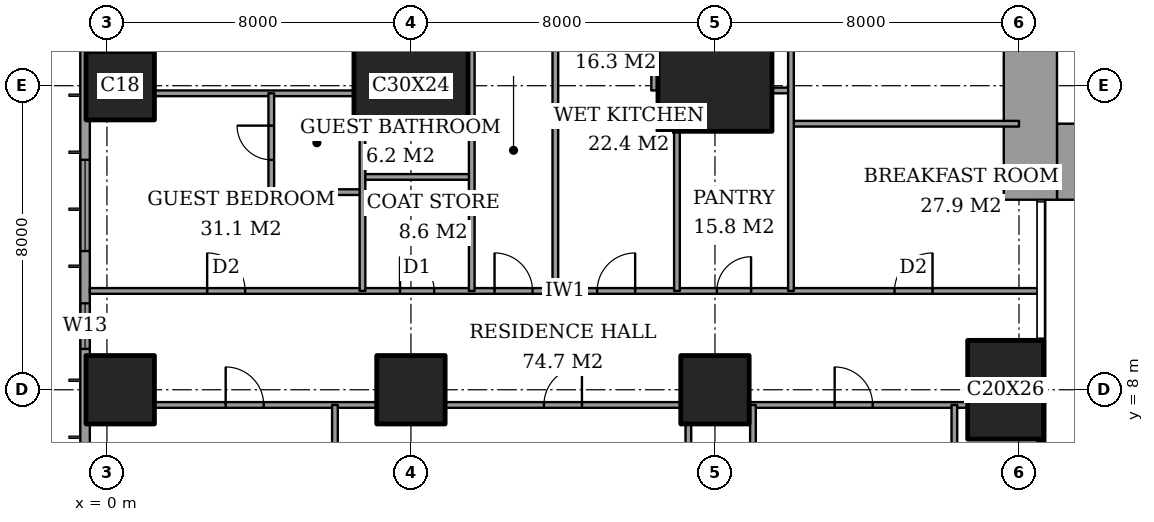
"""IFC4 building model, lengths in metres.
Left out: names, types, materials, properties, quantities, classifications, styles, units other than length and angle.
Written with IfcOpenShell. Run it as: python <this file> out.ifc"""

import sys

from ifc_helpers import new_model, si_unit, direction, frame, frame_2d, origin, origin_2d, place, context, subcontext, project, spatial, rectangle, extrude, element, fill, save


model = new_model("IFC4")
c1 = context("Model", 3, precision=1e-05, world=origin(), true_north=direction((0.0, 1.0)))
c2 = subcontext(c1, "Body", "Model", "MODEL_VIEW")
j1 = project(units=[si_unit("LENGTHUNIT", "METRE"), si_unit("PLANEANGLEUNIT", "RADIAN")], contexts=[c1])
p1 = place(None, origin())
s1 = spatial("IfcSite", under=j1, at=p1, CompositionType="ELEMENT")
p2 = place(p1, origin())
s2 = spatial("IfcBuilding", under=s1, at=p2, CompositionType="ELEMENT")
p3 = place(p2, frame((0.0, 0.0, 211.0)))
s3 = spatial("IfcBuildingStorey", under=s2, at=p3, CompositionType="ELEMENT", Elevation=211.0)
for number, where, z_axis, x_axis in (
    (1, (0.35, 8.0, 0.0), (0.0, 0.0, 1.0), (1.0, 0.0, 0.0)),
    (2, (0.35, 16.0, 0.0), (0.0, 0.0, 1.0), (1.0, 0.0, 0.0)),
    (3, (8.0, 8.0, 0.0), (0.0, 0.0, 1.0), (1.0, 0.0, 0.0)),
):
    element("IfcColumn", number, at=place(p3, frame(where, z_axis=z_axis, x_axis=x_axis)), inside=s3, PredefinedType="COLUMN", context=c2, shape_type="SweptSolid", body=[
        extrude(rectangle(XDim=1.8, YDim=1.8, at=origin_2d()), origin(), (0.0, 0.0, 1.0), 3.6),
    ])
p4 = place(p3, frame((8.0, 16.0, 0.0), z_axis=(0.0, 0.0, 1.0), x_axis=(1.0, 0.0, 0.0)))
e4 = element("IfcColumn", 4, at=p4, inside=s3, PredefinedType="COLUMN", context=c2, shape_type="SweptSolid", body=[
    extrude(rectangle(XDim=3.0, YDim=2.4, at=origin_2d()), origin(), (0.0, 0.0, 1.0), 3.6),
])
p5 = place(p3, frame((16.0, 8.0, 0.0), z_axis=(0.0, 0.0, 1.0), x_axis=(1.0, 0.0, 0.0)))
e5 = element("IfcColumn", 5, at=p5, inside=s3, PredefinedType="COLUMN", context=c2, shape_type="SweptSolid", body=[
    extrude(rectangle(XDim=1.8, YDim=1.8, at=origin_2d()), origin(), (0.0, 0.0, 1.0), 3.6),
])
p6 = place(p3, frame((16.0, 16.0, 0.0), z_axis=(0.0, 0.0, 1.0), x_axis=(1.0, 0.0, 0.0)))
e6 = element("IfcColumn", 6, at=p6, inside=s3, PredefinedType="COLUMN", context=c2, shape_type="SweptSolid", body=[
    extrude(rectangle(XDim=3.0, YDim=2.4, at=origin_2d()), origin(), (0.0, 0.0, 1.0), 3.6),
])
p7 = place(p3, frame((23.65, 8.0, 0.0), z_axis=(0.0, 0.0, 1.0), x_axis=(1.0, 0.0, 0.0)))
e7 = element("IfcColumn", 7, at=p7, inside=s3, PredefinedType="COLUMN", context=c2, shape_type="SweptSolid", body=[
    extrude(rectangle(XDim=2.0, YDim=2.6, at=origin_2d()), origin(), (0.0, 0.0, 1.0), 3.6),
])
p8 = place(p3, frame((25.0, 14.0, 0.0), z_axis=(0.0, 0.0, 1.0), x_axis=(1.0, 0.0, 0.0)))
e8 = element("IfcWall", 8, at=p8, inside=s3, PredefinedType="SHEAR", context=c2, shape_type="SweptSolid", body=[
    extrude(rectangle(XDim=3.15, YDim=2.0, at=frame_2d((1.575, 0.0))), origin(), (0.0, 0.0, 1.0), 3.6),
])
p9 = place(p3, frame((24.3, 13.0, 0.0), z_axis=(0.0, 0.0, 1.0), x_axis=(0.0, 1.0, 0.0)))
e9 = element("IfcWall", 9, at=p9, inside=s3, PredefinedType="SHEAR", context=c2, shape_type="SweptSolid", body=[
    extrude(rectangle(XDim=10.15, YDim=1.4, at=frame_2d((5.075, 0.0))), origin(), (0.0, 0.0, 1.0), 3.6),
])
p10 = place(p3, frame((-0.575, 44.825, 0.0), z_axis=(0.0, 0.0, 1.0), x_axis=(0.0, -1.0, 0.0)))
e10 = element("IfcWall", 10, at=p10, inside=s3, PredefinedType="SOLIDWALL", context=c2, shape_type="SweptSolid", body=[
    extrude(rectangle(XDim=41.65, YDim=0.25, at=frame_2d((20.825, 0.0))), origin(), (0.0, 0.0, 1.0), 3.6),
])
p11 = place(p10, frame((0.825, 0.0, 0.2)))
e11 = element("IfcOpeningElement", 11, at=p11, cuts=e10, PredefinedType="OPENING", context=c2, shape_type="SweptSolid", body=[
    extrude(rectangle(XDim=2.4, YDim=2.4, at=frame_2d((1.2, 1.2))), frame((0.0, 0.135, 0.0), z_axis=(0.0, -1.0, 0.0), x_axis=(1.0, 0.0, 0.0)), (0.0, 0.0, 1.0), 0.27),
])
p12 = place(p10, frame((6.05, 0.0, 0.2)))
e12 = element("IfcOpeningElement", 12, at=p12, cuts=e10, PredefinedType="OPENING", context=c2, shape_type="SweptSolid", body=[
    extrude(rectangle(XDim=1.2, YDim=2.4, at=frame_2d((0.6, 1.2))), frame((0.0, 0.135, 0.0), z_axis=(0.0, -1.0, 0.0), x_axis=(1.0, 0.0, 0.0)), (0.0, 0.0, 1.0), 0.27),
])
p13 = place(p10, frame((8.225, 0.0, 0.2)))
e13 = element("IfcOpeningElement", 13, at=p13, cuts=e10, PredefinedType="OPENING", context=c2, shape_type="SweptSolid", body=[
    extrude(rectangle(XDim=2.4, YDim=2.4, at=frame_2d((1.2, 1.2))), frame((0.0, 0.135, 0.0), z_axis=(0.0, -1.0, 0.0), x_axis=(1.0, 0.0, 0.0)), (0.0, 0.0, 1.0), 0.27),
])
p14 = place(p10, frame((15.625, 0.0, 0.2)))
e14 = element("IfcOpeningElement", 14, at=p14, cuts=e10, PredefinedType="OPENING", context=c2, shape_type="SweptSolid", body=[
    extrude(rectangle(XDim=2.4, YDim=2.4, at=frame_2d((1.2, 1.2))), frame((0.0, 0.135, 0.0), z_axis=(0.0, -1.0, 0.0), x_axis=(1.0, 0.0, 0.0)), (0.0, 0.0, 1.0), 0.27),
])
p15 = place(p10, frame((23.625, 0.0, 0.2)))
e15 = element("IfcOpeningElement", 15, at=p15, cuts=e10, PredefinedType="OPENING", context=c2, shape_type="SweptSolid", body=[
    extrude(rectangle(XDim=2.4, YDim=2.4, at=frame_2d((1.2, 1.2))), frame((0.0, 0.135, 0.0), z_axis=(0.0, -1.0, 0.0), x_axis=(1.0, 0.0, 0.0)), (0.0, 0.0, 1.0), 0.27),
])
p16 = place(p10, frame((30.775, 0.0, 0.2)))
e16 = element("IfcOpeningElement", 16, at=p16, cuts=e10, PredefinedType="OPENING", context=c2, shape_type="SweptSolid", body=[
    extrude(rectangle(XDim=2.4, YDim=2.4, at=frame_2d((1.2, 1.2))), frame((0.0, 0.135, 0.0), z_axis=(0.0, -1.0, 0.0), x_axis=(1.0, 0.0, 0.0)), (0.0, 0.0, 1.0), 0.27),
])
p17 = place(p10, frame((34.55, 0.0, 0.2)))
e17 = element("IfcOpeningElement", 17, at=p17, cuts=e10, PredefinedType="OPENING", context=c2, shape_type="SweptSolid", body=[
    extrude(rectangle(XDim=1.2, YDim=2.4, at=frame_2d((0.6, 1.2))), frame((0.0, 0.135, 0.0), z_axis=(0.0, -1.0, 0.0), x_axis=(1.0, 0.0, 0.0)), (0.0, 0.0, 1.0), 0.27),
])
p18 = place(p10, frame((38.425, 0.0, 0.2)))
e18 = element("IfcOpeningElement", 18, at=p18, cuts=e10, PredefinedType="OPENING", context=c2, shape_type="SweptSolid", body=[
    extrude(rectangle(XDim=2.4, YDim=2.4, at=frame_2d((1.2, 1.2))), frame((0.0, 0.135, 0.0), z_axis=(0.0, -1.0, 0.0), x_axis=(1.0, 0.0, 0.0)), (0.0, 0.0, 1.0), 0.27),
])
p19 = place(p3, frame((1.25, 7.6, 0.0), z_axis=(0.0, 0.0, 1.0), x_axis=(1.0, 0.0, 0.0)))
e19 = element("IfcWall", 19, at=p19, inside=s3, PredefinedType="PARTITIONING", context=c2, shape_type="SweptSolid", body=[
    extrude(rectangle(XDim=5.85, YDim=0.15, at=frame_2d((2.925, 0.0))), origin(), (0.0, 0.0, 1.0), 3.35),
])
p20 = place(p19, frame((1.875, 0.0, 0.0)))
e20 = element("IfcOpeningElement", 20, at=p20, cuts=e19, PredefinedType="OPENING", context=c2, shape_type="SweptSolid", body=[
    extrude(rectangle(XDim=1.0, YDim=2.1, at=frame_2d((0.5, 1.05))), frame((0.0, 0.085, 0.0), z_axis=(0.0, -1.0, 0.0), x_axis=(1.0, 0.0, 0.0)), (0.0, 0.0, 1.0), 0.17),
])
p21 = place(p3, frame((8.9, 7.6, 0.0), z_axis=(0.0, 0.0, 1.0), x_axis=(1.0, 0.0, 0.0)))
e21 = element("IfcWall", 21, at=p21, inside=s3, PredefinedType="PARTITIONING", context=c2, shape_type="SweptSolid", body=[
    extrude(rectangle(XDim=6.2, YDim=0.15, at=frame_2d((3.1, 0.0))), origin(), (0.0, 0.0, 1.0), 3.35),
])
p22 = place(p21, frame((2.6, 0.0, 0.0)))
e22 = element("IfcOpeningElement", 22, at=p22, cuts=e21, PredefinedType="OPENING", context=c2, shape_type="SweptSolid", body=[
    extrude(rectangle(XDim=1.0, YDim=2.1, at=frame_2d((0.5, 1.05))), frame((0.0, 0.085, 0.0), z_axis=(0.0, -1.0, 0.0), x_axis=(1.0, 0.0, 0.0)), (0.0, 0.0, 1.0), 0.17),
])
p23 = place(p3, frame((16.9, 7.6, 0.0), z_axis=(0.0, 0.0, 1.0), x_axis=(1.0, 0.0, 0.0)))
e23 = element("IfcWall", 23, at=p23, inside=s3, PredefinedType="PARTITIONING", context=c2, shape_type="SweptSolid", body=[
    extrude(rectangle(XDim=5.75, YDim=0.15, at=frame_2d((2.875, 0.0))), origin(), (0.0, 0.0, 1.0), 3.35),
])
p24 = place(p23, frame((2.25, 0.0, 0.0)))
e24 = element("IfcOpeningElement", 24, at=p24, cuts=e23, PredefinedType="OPENING", context=c2, shape_type="SweptSolid", body=[
    extrude(rectangle(XDim=1.0, YDim=2.1, at=frame_2d((0.5, 1.05))), frame((0.0, 0.085, 0.0), z_axis=(0.0, -1.0, 0.0), x_axis=(1.0, 0.0, 0.0)), (0.0, 0.0, 1.0), 0.17),
])
p25 = place(p3, frame((-0.45, 10.6, 0.0), z_axis=(0.0, 0.0, 1.0), x_axis=(1.0, 0.0, 0.0)))
e25 = element("IfcWall", 25, at=p25, inside=s3, PredefinedType="PARTITIONING", context=c2, shape_type="SweptSolid", body=[
    extrude(rectangle(XDim=25.011, YDim=0.15, at=frame_2d((12.505, 0.0))), origin(), (0.0, 0.0, 1.0), 3.35),
])
p26 = place(p25, frame((10.65, 0.0, 0.0)))
e26 = element("IfcOpeningElement", 26, at=p26, cuts=e25, PredefinedType="OPENING", context=c2, shape_type="SweptSolid", body=[
    extrude(rectangle(XDim=1.0, YDim=2.1, at=frame_2d((0.5, 1.05))), frame((0.0, 0.085, 0.0), z_axis=(0.0, -1.0, 0.0), x_axis=(1.0, 0.0, 0.0)), (0.0, 0.0, 1.0), 0.17),
])
p27 = place(p25, frame((3.087, 0.0, 0.0)))
e27 = element("IfcOpeningElement", 27, at=p27, cuts=e25, PredefinedType="OPENING", context=c2, shape_type="SweptSolid", body=[
    extrude(rectangle(XDim=1.0, YDim=2.1, at=frame_2d((0.5, 1.05))), frame((0.0, 0.085, 0.0), z_axis=(0.0, -1.0, 0.0), x_axis=(1.0, 0.0, 0.0)), (0.0, 0.0, 1.0), 0.17),
])
p28 = place(p25, frame((8.163, 0.0, 0.0)))
e28 = element("IfcOpeningElement", 28, at=p28, cuts=e25, PredefinedType="OPENING", context=c2, shape_type="SweptSolid", body=[
    extrude(rectangle(XDim=0.9, YDim=2.1, at=frame_2d((0.45, 1.05))), frame((0.0, 0.085, 0.0), z_axis=(0.0, -1.0, 0.0), x_axis=(1.0, 0.0, 0.0)), (0.0, 0.0, 1.0), 0.17),
])
p29 = place(p25, frame((13.35, 0.0, 0.0)))
e29 = element("IfcOpeningElement", 29, at=p29, cuts=e25, PredefinedType="OPENING", context=c2, shape_type="SweptSolid", body=[
    extrude(rectangle(XDim=1.0, YDim=2.1, at=frame_2d((0.5, 1.05))), frame((0.0, 0.085, 0.0), z_axis=(0.0, -1.0, 0.0), x_axis=(1.0, 0.0, 0.0)), (0.0, 0.0, 1.0), 0.17),
])
p30 = place(p25, frame((16.5, 0.0, 0.0)))
e30 = element("IfcOpeningElement", 30, at=p30, cuts=e25, PredefinedType="OPENING", context=c2, shape_type="SweptSolid", body=[
    extrude(rectangle(XDim=0.9, YDim=2.1, at=frame_2d((0.45, 1.05))), frame((0.0, 0.085, 0.0), z_axis=(0.0, -1.0, 0.0), x_axis=(1.0, 0.0, 0.0)), (0.0, 0.0, 1.0), 0.17),
])
p31 = place(p25, frame((21.175, 0.0, 0.0)))
e31 = element("IfcOpeningElement", 31, at=p31, cuts=e25, PredefinedType="OPENING", context=c2, shape_type="SweptSolid", body=[
    extrude(rectangle(XDim=1.0, YDim=2.1, at=frame_2d((0.5, 1.05))), frame((0.0, 0.085, 0.0), z_axis=(0.0, -1.0, 0.0), x_axis=(1.0, 0.0, 0.0)), (0.0, 0.0, 1.0), 0.17),
])
p32 = place(p3, frame((4.325, 13.2, 0.0), z_axis=(0.0, 0.0, 1.0), x_axis=(1.0, 0.0, 0.0)))
e32 = element("IfcWall", 32, at=p32, inside=s3, PredefinedType="PARTITIONING", context=c2, shape_type="SweptSolid", body=[
    extrude(rectangle(XDim=2.4, YDim=0.15, at=frame_2d((1.2, 0.0))), origin(), (0.0, 0.0, 1.0), 3.35),
])
p33 = place(p3, frame((6.725, 13.6, 0.0), z_axis=(0.0, 0.0, 1.0), x_axis=(1.0, 0.0, 0.0)))
e33 = element("IfcWall", 33, at=p33, inside=s3, PredefinedType="PARTITIONING", context=c2, shape_type="SweptSolid", body=[
    extrude(rectangle(XDim=2.875, YDim=0.15, at=frame_2d((1.438, 0.0))), origin(), (0.0, 0.0, 1.0), 3.35),
])
p34 = place(p3, frame((18.0, 15.0, 0.0), z_axis=(0.0, 0.0, 1.0), x_axis=(1.0, 0.0, 0.0)))
e34 = element("IfcWall", 34, at=p34, inside=s3, PredefinedType="PARTITIONING", context=c2, shape_type="SweptSolid", body=[
    extrude(rectangle(XDim=6.0, YDim=0.15, at=frame_2d((3.0, 0.0))), origin(), (0.0, 0.0, 1.0), 3.35),
])
p35 = place(p3, frame((1.25, 15.8, 0.0), z_axis=(0.0, 0.0, 1.0), x_axis=(1.0, 0.0, 0.0)))
e35 = element("IfcWall", 35, at=p35, inside=s3, PredefinedType="PARTITIONING", context=c2, shape_type="SweptSolid", body=[
    extrude(rectangle(XDim=5.25, YDim=0.15, at=frame_2d((2.625, 0.0))), origin(), (0.0, 0.0, 1.0), 3.35),
])
p36 = place(p3, frame((17.5, 15.875, 0.0), z_axis=(0.0, 0.0, 1.0), x_axis=(1.0, 0.0, 0.0)))
e36 = element("IfcWall", 36, at=p36, inside=s3, PredefinedType="PARTITIONING", context=c2, shape_type="SweptSolid", body=[
    extrude(rectangle(XDim=0.5, YDim=0.15, at=frame_2d((0.25, 0.0))), origin(), (0.0, 0.0, 1.0), 2.634),
])
p37 = place(p3, frame((4.325, 13.2, 0.0), z_axis=(0.0, 0.0, 1.0), x_axis=(0.0, 1.0, 0.0)))
e37 = element("IfcWall", 37, at=p37, inside=s3, PredefinedType="PARTITIONING", context=c2, shape_type="SweptSolid", body=[
    extrude(rectangle(XDim=2.6, YDim=0.15, at=frame_2d((1.3, 0.0))), origin(), (0.0, 0.0, 1.0), 3.35),
])
p38 = place(p37, frame((0.85, 0.0, 0.0)))
e38 = element("IfcOpeningElement", 38, at=p38, cuts=e37, PredefinedType="OPENING", context=c2, shape_type="SweptSolid", body=[
    extrude(rectangle(XDim=0.9, YDim=2.1, at=frame_2d((0.45, 1.05))), frame((0.0, 0.085, 0.0), z_axis=(0.0, -1.0, 0.0), x_axis=(1.0, 0.0, 0.0)), (0.0, 0.0, 1.0), 0.17),
])
p39 = place(p3, frame((6.0, -0.45, 0.0), z_axis=(0.0, 0.0, 1.0), x_axis=(0.0, 1.0, 0.0)))
e39 = element("IfcWall", 39, at=p39, inside=s3, PredefinedType="PARTITIONING", context=c2, shape_type="SweptSolid", body=[
    extrude(rectangle(XDim=8.05, YDim=0.15, at=frame_2d((4.025, 0.0))), origin(), (0.0, 0.0, 1.0), 3.35),
])
p40 = place(p3, frame((6.725, 10.6, 0.0), z_axis=(0.0, 0.0, 1.0), x_axis=(0.0, 1.0, 0.0)))
e40 = element("IfcWall", 40, at=p40, inside=s3, PredefinedType="PARTITIONING", context=c2, shape_type="SweptSolid", body=[
    extrude(rectangle(XDim=4.2, YDim=0.15, at=frame_2d((2.1, 0.0))), origin(), (0.0, 0.0, 1.0), 3.35),
])
p41 = place(p3, frame((9.6, 10.6, 0.0), z_axis=(0.0, 0.0, 1.0), x_axis=(0.0, 1.0, 0.0)))
e41 = element("IfcWall", 41, at=p41, inside=s3, PredefinedType="PARTITIONING", context=c2, shape_type="SweptSolid", body=[
    extrude(rectangle(XDim=11.0, YDim=0.15, at=frame_2d((5.5, 0.0))), origin(), (0.0, 0.0, 1.0), 3.35),
])
p42 = place(p41, frame((8.7, 0.0, 0.0)))
e42 = element("IfcOpeningElement", 42, at=p42, cuts=e41, PredefinedType="OPENING", context=c2, shape_type="SweptSolid", body=[
    extrude(rectangle(XDim=1.0, YDim=2.1, at=frame_2d((0.5, 1.05))), frame((0.0, 0.085, 0.0), z_axis=(0.0, -1.0, 0.0), x_axis=(1.0, 0.0, 0.0)), (0.0, 0.0, 1.0), 0.17),
])
p43 = place(p3, frame((11.8, 10.6, 0.0), z_axis=(0.0, 0.0, 1.0), x_axis=(0.0, 1.0, 0.0)))
e43 = element("IfcWall", 43, at=p43, inside=s3, PredefinedType="PARTITIONING", context=c2, shape_type="SweptSolid", body=[
    extrude(rectangle(XDim=7.4, YDim=0.15, at=frame_2d((3.7, 0.0))), origin(), (0.0, 0.0, 1.0), 3.35),
])
p44 = place(p3, frame((14.4, 15.875, 0.0), z_axis=(0.0, 0.0, 1.0), x_axis=(0.0, 1.0, 0.0)))
e44 = element("IfcWall", 44, at=p44, inside=s3, PredefinedType="PARTITIONING", context=c2, shape_type="SweptSolid", body=[
    extrude(rectangle(XDim=2.125, YDim=0.15, at=frame_2d((1.062, 0.0))), origin(), (0.0, 0.0, 1.0), 3.35),
])
p45 = place(p3, frame((15.0, 10.6, 0.0), z_axis=(0.0, 0.0, 1.0), x_axis=(0.0, 1.0, 0.0)))
e45 = element("IfcWall", 45, at=p45, inside=s3, PredefinedType="PARTITIONING", context=c2, shape_type="SweptSolid", body=[
    extrude(rectangle(XDim=4.2, YDim=0.15, at=frame_2d((2.1, 0.0))), origin(), (0.0, 0.0, 1.0), 3.35),
])
p46 = place(p3, frame((15.3, 1.25, 0.0), z_axis=(0.0, 0.0, 1.0), x_axis=(0.0, 1.0, 0.0)))
e46 = element("IfcWall", 46, at=p46, inside=s3, PredefinedType="PARTITIONING", context=c2, shape_type="SweptSolid", body=[
    extrude(rectangle(XDim=5.85, YDim=0.15, at=frame_2d((2.925, 0.0))), origin(), (0.0, 0.0, 1.0), 3.35),
])
p47 = place(p46, frame((2.475, 0.0, 0.0)))
e47 = element("IfcOpeningElement", 47, at=p47, cuts=e46, PredefinedType="OPENING", context=c2, shape_type="SweptSolid", body=[
    extrude(rectangle(XDim=0.9, YDim=2.1, at=frame_2d((0.45, 1.05))), frame((0.0, 0.085, 0.0), z_axis=(0.0, -1.0, 0.0), x_axis=(1.0, 0.0, 0.0)), (0.0, 0.0, 1.0), 0.17),
])
p48 = place(p3, frame((17.0, -0.45, 0.0), z_axis=(0.0, 0.0, 1.0), x_axis=(0.0, 1.0, 0.0)))
e48 = element("IfcWall", 48, at=p48, inside=s3, PredefinedType="PARTITIONING", context=c2, shape_type="SweptSolid", body=[
    extrude(rectangle(XDim=8.05, YDim=0.15, at=frame_2d((4.025, 0.0))), origin(), (0.0, 0.0, 1.0), 3.35),
])
p49 = place(p3, frame((18.0, 10.6, 0.0), z_axis=(0.0, 0.0, 1.0), x_axis=(0.0, 1.0, 0.0)))
e49 = element("IfcWall", 49, at=p49, inside=s3, PredefinedType="PARTITIONING", context=c2, shape_type="SweptSolid", body=[
    extrude(rectangle(XDim=7.4, YDim=0.15, at=frame_2d((3.7, 0.0))), origin(), (0.0, 0.0, 1.0), 3.35),
])
p50 = place(p3, frame((22.3, -0.45, 0.0), z_axis=(0.0, 0.0, 1.0), x_axis=(0.0, 1.0, 0.0)))
e50 = element("IfcWall", 50, at=p50, inside=s3, PredefinedType="PARTITIONING", context=c2, shape_type="SweptSolid", body=[
    extrude(rectangle(XDim=8.05, YDim=0.15, at=frame_2d((4.025, 0.0))), origin(), (0.0, 0.0, 1.0), 3.35),
])
p51 = place(p50, frame((3.575, 0.0, 0.0)))
e51 = element("IfcOpeningElement", 51, at=p51, cuts=e50, PredefinedType="OPENING", context=c2, shape_type="SweptSolid", body=[
    extrude(rectangle(XDim=0.9, YDim=2.1, at=frame_2d((0.45, 1.05))), frame((0.0, 0.085, 0.0), z_axis=(0.0, -1.0, 0.0), x_axis=(1.0, 0.0, 0.0)), (0.0, 0.0, 1.0), 0.17),
])
p52 = place(p16, origin())
e52 = element("IfcWindow", 52, at=p52, inside=s3, PartitioningType="SINGLE_PANEL", PredefinedType="WINDOW", context=c2, shape_type="SweptSolid", body=[
    extrude(rectangle(XDim=2.4, YDim=2.4, at=frame_2d((1.2, 1.2))), frame((0.0, 0.03, 0.0), z_axis=(0.0, -1.0, 0.0), x_axis=(1.0, 0.0, 0.0)), (0.0, 0.0, 1.0), 0.06),
])
fill(e16, e52)
p53 = place(p17, origin())
e53 = element("IfcWindow", 53, at=p53, inside=s3, PartitioningType="SINGLE_PANEL", PredefinedType="WINDOW", context=c2, shape_type="SweptSolid", body=[
    extrude(rectangle(XDim=1.2, YDim=2.4, at=frame_2d((0.6, 1.2))), frame((0.0, 0.03, 0.0), z_axis=(0.0, -1.0, 0.0), x_axis=(1.0, 0.0, 0.0)), (0.0, 0.0, 1.0), 0.06),
])
fill(e17, e53)
p54 = place(p20, origin())
e54 = element("IfcDoor", 54, at=p54, inside=s3, OperationType="SINGLE_SWING_RIGHT", PredefinedType="DOOR", context=c2, shape_type="SweptSolid", body=[
    extrude(rectangle(XDim=1.0, YDim=2.1, at=frame_2d((0.5, 1.05))), frame((0.0, 0.025, 0.0), z_axis=(0.0, -1.0, 0.0), x_axis=(1.0, 0.0, 0.0)), (0.0, 0.0, 1.0), 0.05),
])
fill(e20, e54)
p55 = place(p22, origin())
e55 = element("IfcDoor", 55, at=p55, inside=s3, OperationType="SINGLE_SWING_LEFT", PredefinedType="DOOR", context=c2, shape_type="SweptSolid", body=[
    extrude(rectangle(XDim=1.0, YDim=2.1, at=frame_2d((0.5, 1.05))), frame((0.0, 0.025, 0.0), z_axis=(0.0, -1.0, 0.0), x_axis=(1.0, 0.0, 0.0)), (0.0, 0.0, 1.0), 0.05),
])
fill(e22, e55)
p56 = place(p24, origin())
e56 = element("IfcDoor", 56, at=p56, inside=s3, OperationType="SINGLE_SWING_RIGHT", PredefinedType="DOOR", context=c2, shape_type="SweptSolid", body=[
    extrude(rectangle(XDim=1.0, YDim=2.1, at=frame_2d((0.5, 1.05))), frame((0.0, 0.025, 0.0), z_axis=(0.0, -1.0, 0.0), x_axis=(1.0, 0.0, 0.0)), (0.0, 0.0, 1.0), 0.05),
])
fill(e24, e56)
p57 = place(p26, origin())
e57 = element("IfcDoor", 57, at=p57, inside=s3, OperationType="SINGLE_SWING_RIGHT", PredefinedType="DOOR", context=c2, shape_type="SweptSolid", body=[
    extrude(rectangle(XDim=1.0, YDim=2.1, at=frame_2d((0.5, 1.05))), frame((0.0, 0.025, 0.0), z_axis=(0.0, -1.0, 0.0), x_axis=(1.0, 0.0, 0.0)), (0.0, 0.0, 1.0), 0.05),
])
fill(e26, e57)
p58 = place(p38, origin())
e58 = element("IfcDoor", 58, at=p58, inside=s3, OperationType="SINGLE_SWING_LEFT", PredefinedType="DOOR", context=c2, shape_type="SweptSolid", body=[
    extrude(rectangle(XDim=0.9, YDim=2.1, at=frame_2d((0.45, 1.05))), frame((0.0, 0.025, 0.0), z_axis=(0.0, -1.0, 0.0), x_axis=(1.0, 0.0, 0.0)), (0.0, 0.0, 1.0), 0.05),
])
fill(e38, e58)
p59 = place(p27, origin())
e59 = element("IfcDoor", 59, at=p59, inside=s3, OperationType="SINGLE_SWING_RIGHT", PredefinedType="DOOR", context=c2, shape_type="SweptSolid", body=[
    extrude(rectangle(XDim=1.0, YDim=2.1, at=frame_2d((0.5, 1.05))), frame((0.0, 0.025, 0.0), z_axis=(0.0, -1.0, 0.0), x_axis=(1.0, 0.0, 0.0)), (0.0, 0.0, 1.0), 0.05),
])
fill(e27, e59)
p60 = place(p28, origin())
e60 = element("IfcDoor", 60, at=p60, inside=s3, OperationType="SINGLE_SWING_RIGHT", PredefinedType="DOOR", context=c2, shape_type="SweptSolid", body=[
    extrude(rectangle(XDim=0.9, YDim=2.1, at=frame_2d((0.45, 1.05))), frame((0.0, 0.025, 0.0), z_axis=(0.0, -1.0, 0.0), x_axis=(1.0, 0.0, 0.0)), (0.0, 0.0, 1.0), 0.05),
])
fill(e28, e60)
p61 = place(p29, origin())
e61 = element("IfcDoor", 61, at=p61, inside=s3, OperationType="SINGLE_SWING_LEFT", PredefinedType="DOOR", context=c2, shape_type="SweptSolid", body=[
    extrude(rectangle(XDim=1.0, YDim=2.1, at=frame_2d((0.5, 1.05))), frame((0.0, 0.025, 0.0), z_axis=(0.0, -1.0, 0.0), x_axis=(1.0, 0.0, 0.0)), (0.0, 0.0, 1.0), 0.05),
])
fill(e29, e61)
p62 = place(p30, origin())
e62 = element("IfcDoor", 62, at=p62, inside=s3, OperationType="SINGLE_SWING_LEFT", PredefinedType="DOOR", context=c2, shape_type="SweptSolid", body=[
    extrude(rectangle(XDim=0.9, YDim=2.1, at=frame_2d((0.45, 1.05))), frame((0.0, 0.025, 0.0), z_axis=(0.0, -1.0, 0.0), x_axis=(1.0, 0.0, 0.0)), (0.0, 0.0, 1.0), 0.05),
])
fill(e30, e62)
p63 = place(p31, origin())
e63 = element("IfcDoor", 63, at=p63, inside=s3, OperationType="SINGLE_SWING_LEFT", PredefinedType="DOOR", context=c2, shape_type="SweptSolid", body=[
    extrude(rectangle(XDim=1.0, YDim=2.1, at=frame_2d((0.5, 1.05))), frame((0.0, 0.025, 0.0), z_axis=(0.0, -1.0, 0.0), x_axis=(1.0, 0.0, 0.0)), (0.0, 0.0, 1.0), 0.05),
])
fill(e31, e63)
save(model, sys.argv[1])
